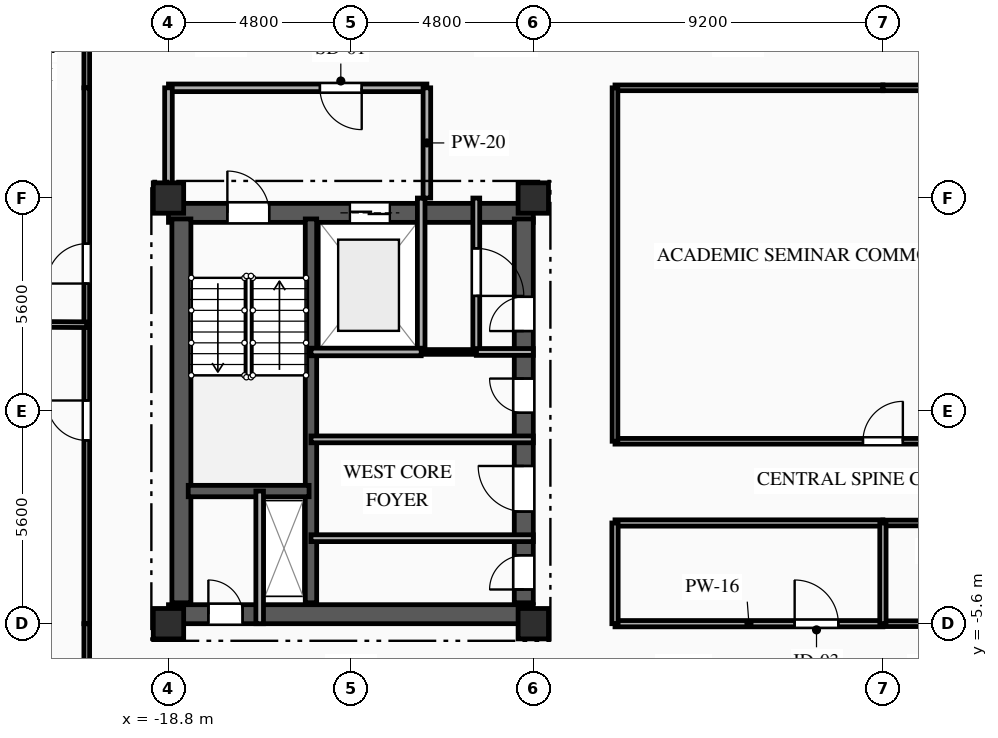
"""IFC4 building model, lengths in metres.
Left out: names, types, materials, properties, quantities, classifications, styles, units other than length and angle.
Written with IfcOpenShell. Run it as: python <this file> out.ifc"""

import sys

from ifc_helpers import new_model, si_unit, direction, frame, frame_2d, origin, origin_2d, place, context, subcontext, project, spatial, rectangle, extrude, element, fill, save


model = new_model("IFC4")
c1 = context("Model", 3, precision=1e-05, world=origin(), true_north=direction((0.0, 1.0)))
c2 = subcontext(c1, "Body", "Model", "MODEL_VIEW")
j1 = project(units=[si_unit("LENGTHUNIT", "METRE"), si_unit("PLANEANGLEUNIT", "RADIAN")], contexts=[c1])
p1 = place(None, origin())
s1 = spatial("IfcSite", under=j1, at=p1, CompositionType="ELEMENT")
p2 = place(p1, origin())
s2 = spatial("IfcBuilding", under=s1, at=p2, CompositionType="ELEMENT")
p3 = place(p2, frame((0.0, 0.0, 193.05)))
s3 = spatial("IfcBuildingStorey", under=s2, at=p3, CompositionType="ELEMENT", Elevation=193.05)
for number, where, z_axis, x_axis in (
    (1, (-18.8, -5.6, 0.0), (0.0, 0.0, 1.0), (1.0, 0.0, 0.0)),
    (2, (-18.8, 5.6, 0.0), (0.0, 0.0, 1.0), (1.0, 0.0, 0.0)),
    (3, (-9.2, -5.6, 0.0), (0.0, 0.0, 1.0), (1.0, 0.0, 0.0)),
    (4, (-9.2, 5.6, 0.0), (0.0, 0.0, 1.0), (1.0, 0.0, 0.0)),
):
    element("IfcColumn", number, at=place(p3, frame(where, z_axis=z_axis, x_axis=x_axis)), inside=s3, PredefinedType="COLUMN", context=c2, shape_type="SweptSolid", body=[
        extrude(rectangle(XDim=0.8, YDim=0.8, at=origin_2d()), origin(), (0.0, 0.0, 1.0), 3.35),
    ])
p4 = place(p3, frame((-18.8, 5.21, 0.0), z_axis=(0.0, 0.0, 1.0), x_axis=(1.0, 0.0, 0.0)))
e5 = element("IfcWall", 5, at=p4, inside=s3, PredefinedType="SHEAR", context=c2, shape_type="SweptSolid", body=[
    extrude(rectangle(XDim=9.6, YDim=0.5, at=frame_2d((4.8, 0.0))), origin(), (0.0, 0.0, 1.0), 3.04),
])
p5 = place(p4, frame((1.55, 0.0, 0.0)))
e6 = element("IfcOpeningElement", 6, at=p5, cuts=e5, PredefinedType="OPENING", context=c2, shape_type="SweptSolid", body=[
    extrude(rectangle(XDim=1.1, YDim=2.15, at=frame_2d((0.55, 1.075))), frame((0.0, 0.26, 0.0), z_axis=(0.0, -1.0, 0.0), x_axis=(1.0, 0.0, 0.0)), (0.0, 0.0, 1.0), 0.52),
])
p6 = place(p4, frame((4.775, 0.0, 0.0)))
e7 = element("IfcOpeningElement", 7, at=p6, cuts=e5, PredefinedType="OPENING", context=c2, shape_type="SweptSolid", body=[
    extrude(rectangle(XDim=1.05, YDim=2.1, at=frame_2d((0.525, 1.05))), frame((0.0, 0.26, 0.0), z_axis=(0.0, -1.0, 0.0), x_axis=(1.0, 0.0, 0.0)), (0.0, 0.0, 1.0), 0.52),
])
p7 = place(p3, frame((-18.8, -5.35, 0.0), z_axis=(0.0, 0.0, 1.0), x_axis=(1.0, 0.0, 0.0)))
e8 = element("IfcWall", 8, at=p7, inside=s3, PredefinedType="SHEAR", context=c2, shape_type="SweptSolid", body=[
    extrude(rectangle(XDim=9.6, YDim=0.5, at=frame_2d((4.8, 0.0))), origin(), (0.0, 0.0, 1.0), 3.04),
])
p8 = place(p7, frame((1.05, 0.0, 0.0)))
e9 = element("IfcOpeningElement", 9, at=p8, cuts=e8, PredefinedType="OPENING", context=c2, shape_type="SweptSolid", body=[
    extrude(rectangle(XDim=0.9, YDim=2.1, at=frame_2d((0.45, 1.05))), frame((0.0, 0.26, 0.0), z_axis=(0.0, -1.0, 0.0), x_axis=(1.0, 0.0, 0.0)), (0.0, 0.0, 1.0), 0.52),
])
p9 = place(p3, frame((-18.46, -5.05, 0.0), z_axis=(0.0, 0.0, 1.0), x_axis=(0.0, 1.0, 0.0)))
e10 = element("IfcWall", 10, at=p9, inside=s3, PredefinedType="SHEAR", context=c2, shape_type="SweptSolid", body=[
    extrude(rectangle(XDim=10.1, YDim=0.5, at=frame_2d((5.05, 0.0))), origin(), (0.0, 0.0, 1.0), 3.04),
])
p10 = place(p3, frame((-9.45, -5.05, 0.0), z_axis=(0.0, 0.0, 1.0), x_axis=(0.0, 1.0, 0.0)))
e11 = element("IfcWall", 11, at=p10, inside=s3, PredefinedType="SHEAR", context=c2, shape_type="SweptSolid", body=[
    extrude(rectangle(XDim=10.1, YDim=0.5, at=frame_2d((5.05, 0.0))), origin(), (0.0, 0.0, 1.0), 3.04),
])
p11 = place(p10, frame((7.15, 0.0, 0.0)))
e12 = element("IfcOpeningElement", 12, at=p11, cuts=e11, PredefinedType="OPENING", context=c2, shape_type="SweptSolid", body=[
    extrude(rectangle(XDim=0.9, YDim=2.1, at=frame_2d((0.45, 1.05))), frame((0.0, 0.26, 0.0), z_axis=(0.0, -1.0, 0.0), x_axis=(1.0, 0.0, 0.0)), (0.0, 0.0, 1.0), 0.52),
])
p12 = place(p10, frame((2.4, 0.0, 0.0)))
e13 = element("IfcOpeningElement", 13, at=p12, cuts=e11, PredefinedType="OPENING", context=c2, shape_type="SweptSolid", body=[
    extrude(rectangle(XDim=1.2, YDim=2.15, at=frame_2d((0.6, 1.075))), frame((0.0, 0.26, 0.0), z_axis=(0.0, -1.0, 0.0), x_axis=(1.0, 0.0, 0.0)), (0.0, 0.0, 1.0), 0.52),
])
p13 = place(p10, frame((0.35, 0.0, 0.0)))
e14 = element("IfcOpeningElement", 14, at=p13, cuts=e11, PredefinedType="OPENING", context=c2, shape_type="SweptSolid", body=[
    extrude(rectangle(XDim=0.9, YDim=2.1, at=frame_2d((0.45, 1.05))), frame((0.0, 0.26, 0.0), z_axis=(0.0, -1.0, 0.0), x_axis=(1.0, 0.0, 0.0)), (0.0, 0.0, 1.0), 0.52),
])
p14 = place(p10, frame((5.0, 0.0, 0.0)))
e15 = element("IfcOpeningElement", 15, at=p14, cuts=e11, PredefinedType="OPENING", context=c2, shape_type="SweptSolid", body=[
    extrude(rectangle(XDim=0.9, YDim=2.1, at=frame_2d((0.45, 1.05))), frame((0.0, 0.26, 0.0), z_axis=(0.0, -1.0, 0.0), x_axis=(1.0, 0.0, 0.0)), (0.0, 0.0, 1.0), 0.52),
])
p15 = place(p3, frame((-15.05, -5.05, 0.0), z_axis=(0.0, 0.0, 1.0), x_axis=(0.0, 1.0, 0.0)))
e16 = element("IfcWall", 16, at=p15, inside=s3, PredefinedType="SHEAR", context=c2, shape_type="SweptSolid", body=[
    extrude(rectangle(XDim=10.1, YDim=0.3, at=frame_2d((5.05, 0.0))), origin(), (0.0, 0.0, 1.0), 3.04),
])
p16 = place(p3, frame((-18.28, -2.11, 0.0), z_axis=(0.0, 0.0, 1.0), x_axis=(1.0, 0.0, 0.0)))
e17 = element("IfcWall", 17, at=p16, inside=s3, PredefinedType="SHEAR", context=c2, shape_type="SweptSolid", body=[
    extrude(rectangle(XDim=3.18, YDim=0.3, at=frame_2d((1.59, 0.0))), origin(), (0.0, 0.0, 1.0), 3.04),
])
p17 = place(p3, frame((-16.4, -5.6, 0.0), z_axis=(0.0, 0.0, 1.0), x_axis=(0.0, 1.0, 0.0)))
e18 = element("IfcWall", 18, at=p17, inside=s3, PredefinedType="PARTITIONING", context=c2, shape_type="SweptSolid", body=[
    extrude(rectangle(XDim=3.49, YDim=0.2, at=frame_2d((1.745, 0.0))), origin(), (0.0, 0.0, 1.0), 3.04),
])
p18 = place(p3, frame((-12.15, 1.55, 0.0), z_axis=(0.0, 0.0, 1.0), x_axis=(0.0, 1.0, 0.0)))
e19 = element("IfcWall", 19, at=p18, inside=s3, PredefinedType="PARTITIONING", context=c2, shape_type="SweptSolid", body=[
    extrude(rectangle(XDim=4.05, YDim=0.2, at=frame_2d((2.025, 0.0))), origin(), (0.0, 0.0, 1.0), 3.04),
])
p19 = place(p3, frame((-12.0, 8.5, 0.0), z_axis=(0.0, 0.0, 1.0), x_axis=(-1.0, 0.0, 0.0)))
e20 = element("IfcWall", 20, at=p19, inside=s3, PredefinedType="PARTITIONING", context=c2, shape_type="SweptSolid", body=[
    extrude(rectangle(XDim=6.8, YDim=0.2, at=frame_2d((3.4, 0.0))), origin(), (0.0, 0.0, 1.0), 3.04),
])
p20 = place(p19, frame((1.715, 0.0, 0.0)))
e21 = element("IfcOpeningElement", 21, at=p20, cuts=e20, PredefinedType="OPENING", context=c2, shape_type="SweptSolid", body=[
    extrude(rectangle(XDim=1.1, YDim=2.15, at=frame_2d((0.55, 1.075))), frame((0.0, 0.11, 0.0), z_axis=(0.0, -1.0, 0.0), x_axis=(1.0, 0.0, 0.0)), (0.0, 0.0, 1.0), 0.22),
])
p21 = place(p3, frame((-18.8, 8.5, 0.0), z_axis=(0.0, 0.0, 1.0), x_axis=(0.0, -1.0, 0.0)))
e22 = element("IfcWall", 22, at=p21, inside=s3, PredefinedType="PARTITIONING", context=c2, shape_type="SweptSolid", body=[
    extrude(rectangle(XDim=2.9, YDim=0.2, at=frame_2d((1.45, 0.0))), origin(), (0.0, 0.0, 1.0), 2.665),
])
p22 = place(p3, frame((-12.0, 5.6, 0.0), z_axis=(0.0, 0.0, 1.0), x_axis=(0.0, 1.0, 0.0)))
e23 = element("IfcWall", 23, at=p22, inside=s3, PredefinedType="PARTITIONING", context=c2, shape_type="SweptSolid", body=[
    extrude(rectangle(XDim=2.9, YDim=0.2, at=frame_2d((1.45, 0.0))), origin(), (0.0, 0.0, 1.0), 3.04),
])
p23 = place(p3, frame((-10.7, 5.6, 0.0), z_axis=(0.0, 0.0, 1.0), x_axis=(0.0, -1.0, 0.0)))
e24 = element("IfcWall", 24, at=p23, inside=s3, PredefinedType="PARTITIONING", context=c2, shape_type="SweptSolid", body=[
    extrude(rectangle(XDim=4.05, YDim=0.18, at=frame_2d((2.025, 0.0))), origin(), (0.0, 0.0, 1.0), 3.04),
])
p24 = place(p23, frame((1.325, 0.0, 0.0)))
e25 = element("IfcOpeningElement", 25, at=p24, cuts=e24, PredefinedType="OPENING", context=c2, shape_type="SweptSolid", body=[
    extrude(rectangle(XDim=1.25, YDim=2.2, at=frame_2d((0.625, 1.1))), frame((0.0, 0.1, 0.0), z_axis=(0.0, -1.0, 0.0), x_axis=(1.0, 0.0, 0.0)), (0.0, 0.0, 1.0), 0.2),
])
p25 = place(p3, frame((-10.7, 1.55, 0.0), z_axis=(0.0, 0.0, 1.0), x_axis=(1.0, 0.0, 0.0)))
e26 = element("IfcWall", 26, at=p25, inside=s3, PredefinedType="PARTITIONING", context=c2, shape_type="SweptSolid", body=[
    extrude(rectangle(XDim=1.5, YDim=0.18, at=frame_2d((0.75, 0.0))), origin(), (0.0, 0.0, 1.0), 3.04),
])
p26 = place(p3, frame((-12.15, 1.55, 0.0), z_axis=(0.0, 0.0, 1.0), x_axis=(1.0, 0.0, 0.0)))
e27 = element("IfcWall", 27, at=p26, inside=s3, PredefinedType="PARTITIONING", context=c2, shape_type="SweptSolid", body=[
    extrude(rectangle(XDim=1.45, YDim=0.125, at=frame_2d((0.725, 0.0))), origin(), (0.0, 0.0, 1.0), 3.04),
])
p27 = place(p3, frame((-15.05, -3.35, 0.0), z_axis=(0.0, 0.0, 1.0), x_axis=(1.0, 0.0, 0.0)))
e28 = element("IfcWall", 28, at=p27, inside=s3, PredefinedType="PARTITIONING", context=c2, shape_type="SweptSolid", body=[
    extrude(rectangle(XDim=5.85, YDim=0.18, at=frame_2d((2.925, 0.0))), origin(), (0.0, 0.0, 1.0), 2.755),
])
p28 = place(p3, frame((-9.2, -0.75, 0.0), z_axis=(0.0, 0.0, 1.0), x_axis=(-1.0, 0.0, 0.0)))
e29 = element("IfcWall", 29, at=p28, inside=s3, PredefinedType="PARTITIONING", context=c2, shape_type="SweptSolid", body=[
    extrude(rectangle(XDim=5.85, YDim=0.18, at=frame_2d((2.925, 0.0))), origin(), (0.0, 0.0, 1.0), 3.04),
])
p29 = place(p3, frame((-20.95, 8.5, 0.0), z_axis=(0.0, 0.0, 1.0), x_axis=(0.0, 1.0, 0.0)))
e30 = element("IfcWall", 30, at=p29, inside=s3, PredefinedType="PARTITIONING", context=c2, shape_type="SweptSolid", body=[
    extrude(rectangle(XDim=2.15, YDim=0.15, at=frame_2d((1.075, 0.0))), origin(), (0.0, 0.0, 1.0), 3.04),
])
for number, where, z_axis, x_axis in (
    (31, (0.0, 8.5, 0.0), (0.0, 0.0, 1.0), (-1.0, 0.0, 0.0)),
    (32, (7.05, 8.5, 0.0), (0.0, 0.0, 1.0), (-1.0, 0.0, 0.0)),
):
    element("IfcWall", number, at=place(p3, frame(where, z_axis=z_axis, x_axis=x_axis)), inside=s3, PredefinedType="PARTITIONING", context=c2, shape_type="SweptSolid", body=[
        extrude(rectangle(XDim=7.05, YDim=0.15, at=frame_2d((3.525, 0.0))), origin(), (0.0, 0.0, 1.0), 3.04),
    ])
p30 = place(p3, frame((-20.95, -7.75, 0.0), z_axis=(0.0, 0.0, 1.0), x_axis=(0.0, 1.0, 0.0)))
e33 = element("IfcWall", 33, at=p30, inside=s3, PredefinedType="PARTITIONING", context=c2, shape_type="SweptSolid", body=[
    extrude(rectangle(XDim=2.15, YDim=0.15, at=frame_2d((1.075, 0.0))), origin(), (0.0, 0.0, 1.0), 3.04),
])
p31 = place(p3, frame((-7.05, -5.6, 0.0), z_axis=(0.0, 0.0, 1.0), x_axis=(1.0, 0.0, 0.0)))
e34 = element("IfcWall", 34, at=p31, inside=s3, PredefinedType="PARTITIONING", context=c2, shape_type="SweptSolid", body=[
    extrude(rectangle(XDim=7.05, YDim=0.165, at=frame_2d((3.525, 0.0))), origin(), (0.0, 0.0, 1.0), 2.525),
])
p32 = place(p31, frame((4.728, 0.0, 0.0)))
e35 = element("IfcOpeningElement", 35, at=p32, cuts=e34, PredefinedType="OPENING", context=c2, shape_type="SweptSolid", body=[
    extrude(rectangle(XDim=1.15, YDim=2.15, at=frame_2d((0.575, 1.075))), frame((0.0, 0.093, 0.0), z_axis=(0.0, -1.0, 0.0), x_axis=(1.0, 0.0, 0.0)), (0.0, 0.0, 1.0), 0.185),
])
p33 = place(p3, frame((0.0, -5.6, 0.0), z_axis=(0.0, 0.0, 1.0), x_axis=(1.0, 0.0, 0.0)))
e36 = element("IfcWall", 36, at=p33, inside=s3, PredefinedType="PARTITIONING", context=c2, shape_type="SweptSolid", body=[
    extrude(rectangle(XDim=7.05, YDim=0.15, at=frame_2d((3.525, 0.0))), origin(), (0.0, 0.0, 1.0), 2.525),
])
p34 = place(p33, frame((1.185, 0.0, 0.0)))
e37 = element("IfcOpeningElement", 37, at=p34, cuts=e36, PredefinedType="OPENING", context=c2, shape_type="SweptSolid", body=[
    extrude(rectangle(XDim=1.05, YDim=2.15, at=frame_2d((0.525, 1.075))), frame((0.0, 0.085, 0.0), z_axis=(0.0, -1.0, 0.0), x_axis=(1.0, 0.0, 0.0)), (0.0, 0.0, 1.0), 0.17),
])
p35 = place(p3, frame((-20.95, -5.6, 0.0), z_axis=(0.0, 0.0, 1.0), x_axis=(0.0, 1.0, 0.0)))
e38 = element("IfcWall", 38, at=p35, inside=s3, PredefinedType="PARTITIONING", context=c2, shape_type="SweptSolid", body=[
    extrude(rectangle(XDim=7.867, YDim=0.15, at=frame_2d((3.934, 0.0))), origin(), (0.0, 0.0, 1.0), 3.04),
])
p36 = place(p35, frame((4.823, 0.0, 0.0)))
e39 = element("IfcOpeningElement", 39, at=p36, cuts=e38, PredefinedType="OPENING", context=c2, shape_type="SweptSolid", body=[
    extrude(rectangle(XDim=1.05, YDim=2.15, at=frame_2d((0.525, 1.075))), frame((0.0, 0.085, 0.0), z_axis=(0.0, -1.0, 0.0), x_axis=(1.0, 0.0, 0.0)), (0.0, 0.0, 1.0), 0.17),
])
p37 = place(p3, frame((-20.95, 2.267, 0.0), z_axis=(0.0, 0.0, 1.0), x_axis=(0.0, 1.0, 0.0)))
e40 = element("IfcWall", 40, at=p37, inside=s3, PredefinedType="PARTITIONING", context=c2, shape_type="SweptSolid", body=[
    extrude(rectangle(XDim=6.233, YDim=0.15, at=frame_2d((3.116, 0.0))), origin(), (0.0, 0.0, 1.0), 3.04),
])
p38 = place(p37, frame((1.083, 0.0, 0.0)))
e41 = element("IfcOpeningElement", 41, at=p38, cuts=e40, PredefinedType="OPENING", context=c2, shape_type="SweptSolid", body=[
    extrude(rectangle(XDim=1.05, YDim=2.15, at=frame_2d((0.525, 1.075))), frame((0.0, 0.085, 0.0), z_axis=(0.0, -1.0, 0.0), x_axis=(1.0, 0.0, 0.0)), (0.0, 0.0, 1.0), 0.17),
])
p39 = place(p3, frame((-7.05, -0.8, 0.0), z_axis=(0.0, 0.0, 1.0), x_axis=(1.0, 0.0, 0.0)))
e42 = element("IfcWall", 42, at=p39, inside=s3, PredefinedType="PARTITIONING", context=c2, shape_type="SweptSolid", body=[
    extrude(rectangle(XDim=14.1, YDim=0.15, at=frame_2d((7.05, 0.0))), origin(), (0.0, 0.0, 1.0), 3.04),
])
p40 = place(p39, frame((6.525, 0.0, 0.0)))
e43 = element("IfcOpeningElement", 43, at=p40, cuts=e42, PredefinedType="OPENING", context=c2, shape_type="SweptSolid", body=[
    extrude(rectangle(XDim=1.05, YDim=2.15, at=frame_2d((0.525, 1.075))), frame((0.0, 0.085, 0.0), z_axis=(0.0, -1.0, 0.0), x_axis=(1.0, 0.0, 0.0)), (0.0, 0.0, 1.0), 0.17),
])
p41 = place(p3, frame((0.0, -2.95, 0.0), z_axis=(0.0, 0.0, 1.0), x_axis=(-1.0, 0.0, 0.0)))
e44 = element("IfcWall", 44, at=p41, inside=s3, PredefinedType="PARTITIONING", context=c2, shape_type="SweptSolid", body=[
    extrude(rectangle(XDim=7.05, YDim=0.165, at=frame_2d((3.525, 0.0))), origin(), (0.0, 0.0, 1.0), 3.04),
])
p42 = place(p3, frame((7.05, -2.95, 0.0), z_axis=(0.0, 0.0, 1.0), x_axis=(-1.0, 0.0, 0.0)))
e45 = element("IfcWall", 45, at=p42, inside=s3, PredefinedType="PARTITIONING", context=c2, shape_type="SweptSolid", body=[
    extrude(rectangle(XDim=7.05, YDim=0.15, at=frame_2d((3.525, 0.0))), origin(), (0.0, 0.0, 1.0), 3.04),
])
p43 = place(p3, frame((-7.05, 8.5, 0.0), z_axis=(0.0, 0.0, 1.0), x_axis=(0.0, -1.0, 0.0)))
e46 = element("IfcWall", 46, at=p43, inside=s3, PredefinedType="PARTITIONING", context=c2, shape_type="SweptSolid", body=[
    extrude(rectangle(XDim=9.3, YDim=0.15, at=frame_2d((4.65, 0.0))), origin(), (0.0, 0.0, 1.0), 3.04),
])
p44 = place(p3, frame((-7.05, -2.95, 0.0), z_axis=(0.0, 0.0, 1.0), x_axis=(0.0, -1.0, 0.0)))
e47 = element("IfcWall", 47, at=p44, inside=s3, PredefinedType="PARTITIONING", context=c2, shape_type="SweptSolid", body=[
    extrude(rectangle(XDim=2.65, YDim=0.165, at=frame_2d((1.325, 0.0))), origin(), (0.0, 0.0, 1.0), 3.04),
])
p45 = place(p3, frame((-28.021, 2.311, 0.0), z_axis=(0.0, 0.0, 1.0), x_axis=(0.99998090118, -0.006180394355, 0.0)))
e48 = element("IfcWall", 48, at=p45, inside=s3, PredefinedType="PARTITIONING", context=c2, shape_type="SweptSolid", body=[
    extrude(rectangle(XDim=7.071, YDim=0.15, at=frame_2d((3.536, 0.0))), origin(), (0.0, 0.0, 1.0), 3.04),
])
p46 = place(p3, frame((0.0, -2.95, 0.0), z_axis=(0.0, 0.0, 1.0), x_axis=(0.0, -1.0, 0.0)))
e49 = element("IfcWall", 49, at=p46, inside=s3, PredefinedType="PARTITIONING", context=c2, shape_type="SweptSolid", body=[
    extrude(rectangle(XDim=2.65, YDim=0.165, at=frame_2d((1.325, 0.0))), origin(), (0.0, 0.0, 1.0), 3.04),
])
p47 = place(p3, frame((-15.05, 1.55, 0.0), z_axis=(0.0, 0.0, 1.0), x_axis=(1.0, 0.0, 0.0)))
e50 = element("IfcWall", 50, at=p47, inside=s3, PredefinedType="PARTITIONING", context=c2, shape_type="SweptSolid", body=[
    extrude(rectangle(XDim=2.9, YDim=0.2, at=frame_2d((1.45, 0.0))), origin(), (0.0, 0.0, 1.0), 3.04),
])
p48 = place(p5, origin())
e51 = element("IfcDoor", 51, at=p48, inside=s3, OperationType="SINGLE_SWING_LEFT", PredefinedType="DOOR", context=c2, shape_type="SweptSolid", body=[
    extrude(rectangle(XDim=1.1, YDim=2.15, at=frame_2d((0.55, 1.075))), frame((0.0, 0.025, 0.0), z_axis=(0.0, -1.0, 0.0), x_axis=(1.0, 0.0, 0.0)), (0.0, 0.0, 1.0), 0.05),
])
fill(e6, e51)
p49 = place(p6, origin())
e52 = element("IfcDoor", 52, at=p49, inside=s3, OperationType="DOUBLE_DOOR_SLIDING", PredefinedType="DOOR", context=c2, shape_type="SweptSolid", body=[
    extrude(rectangle(XDim=1.05, YDim=2.1, at=frame_2d((0.525, 1.05))), frame((0.0, 0.025, 0.0), z_axis=(0.0, -1.0, 0.0), x_axis=(1.0, 0.0, 0.0)), (0.0, 0.0, 1.0), 0.05),
])
fill(e7, e52)
p50 = place(p8, origin())
e53 = element("IfcDoor", 53, at=p50, inside=s3, OperationType="SINGLE_SWING_LEFT", PredefinedType="DOOR", context=c2, shape_type="SweptSolid", body=[
    extrude(rectangle(XDim=0.9, YDim=2.1, at=frame_2d((0.45, 1.05))), frame((0.0, 0.025, 0.0), z_axis=(0.0, -1.0, 0.0), x_axis=(1.0, 0.0, 0.0)), (0.0, 0.0, 1.0), 0.05),
])
fill(e9, e53)
p51 = place(p20, origin())
e54 = element("IfcDoor", 54, at=p51, inside=s3, OperationType="SINGLE_SWING_LEFT", PredefinedType="DOOR", context=c2, shape_type="SweptSolid", body=[
    extrude(rectangle(XDim=1.1, YDim=2.15, at=frame_2d((0.55, 1.075))), frame((0.0, 0.025, 0.0), z_axis=(0.0, -1.0, 0.0), x_axis=(1.0, 0.0, 0.0)), (0.0, 0.0, 1.0), 0.05),
])
fill(e21, e54)
p52 = place(p24, origin())
e55 = element("IfcDoor", 55, at=p52, inside=s3, OperationType="SINGLE_SWING_RIGHT", PredefinedType="DOOR", context=c2, shape_type="SweptSolid", body=[
    extrude(rectangle(XDim=1.25, YDim=2.2, at=frame_2d((0.625, 1.1))), frame((0.0, 0.025, 0.0), z_axis=(0.0, -1.0, 0.0), x_axis=(1.0, 0.0, 0.0)), (0.0, 0.0, 1.0), 0.05),
])
fill(e25, e55)
p53 = place(p11, origin())
e56 = element("IfcDoor", 56, at=p53, inside=s3, OperationType="SINGLE_SWING_LEFT", PredefinedType="DOOR", context=c2, shape_type="SweptSolid", body=[
    extrude(rectangle(XDim=0.9, YDim=2.1, at=frame_2d((0.45, 1.05))), frame((0.0, 0.025, 0.0), z_axis=(0.0, -1.0, 0.0), x_axis=(1.0, 0.0, 0.0)), (0.0, 0.0, 1.0), 0.05),
])
fill(e12, e56)
p54 = place(p12, origin())
e57 = element("IfcDoor", 57, at=p54, inside=s3, OperationType="SINGLE_SWING_RIGHT", PredefinedType="DOOR", context=c2, shape_type="SweptSolid", body=[
    extrude(rectangle(XDim=1.2, YDim=2.15, at=frame_2d((0.6, 1.075))), frame((0.0, 0.025, 0.0), z_axis=(0.0, -1.0, 0.0), x_axis=(1.0, 0.0, 0.0)), (0.0, 0.0, 1.0), 0.05),
])
fill(e13, e57)
p55 = place(p13, origin())
e58 = element("IfcDoor", 58, at=p55, inside=s3, OperationType="SINGLE_SWING_LEFT", PredefinedType="DOOR", context=c2, shape_type="SweptSolid", body=[
    extrude(rectangle(XDim=0.9, YDim=2.1, at=frame_2d((0.45, 1.05))), frame((0.0, 0.025, 0.0), z_axis=(0.0, -1.0, 0.0), x_axis=(1.0, 0.0, 0.0)), (0.0, 0.0, 1.0), 0.05),
])
fill(e14, e58)
p56 = place(p14, origin())
e59 = element("IfcDoor", 59, at=p56, inside=s3, OperationType="SINGLE_SWING_RIGHT", PredefinedType="DOOR", context=c2, shape_type="SweptSolid", body=[
    extrude(rectangle(XDim=0.9, YDim=2.1, at=frame_2d((0.45, 1.05))), frame((0.0, 0.025, 0.0), z_axis=(0.0, -1.0, 0.0), x_axis=(1.0, 0.0, 0.0)), (0.0, 0.0, 1.0), 0.05),
])
fill(e15, e59)
p57 = place(p32, origin())
e60 = element("IfcDoor", 60, at=p57, inside=s3, OperationType="SINGLE_SWING_LEFT", PredefinedType="DOOR", context=c2, shape_type="SweptSolid", body=[
    extrude(rectangle(XDim=1.15, YDim=2.15, at=frame_2d((0.575, 1.075))), frame((0.0, 0.025, 0.0), z_axis=(0.0, -1.0, 0.0), x_axis=(1.0, 0.0, 0.0)), (0.0, 0.0, 1.0), 0.05),
])
fill(e35, e60)
p58 = place(p36, origin())
e61 = element("IfcDoor", 61, at=p58, inside=s3, OperationType="SINGLE_SWING_RIGHT", PredefinedType="DOOR", context=c2, shape_type="SweptSolid", body=[
    extrude(rectangle(XDim=1.05, YDim=2.15, at=frame_2d((0.525, 1.075))), frame((0.0, 0.025, 0.0), z_axis=(0.0, -1.0, 0.0), x_axis=(1.0, 0.0, 0.0)), (0.0, 0.0, 1.0), 0.05),
])
fill(e39, e61)
p59 = place(p38, origin())
e62 = element("IfcDoor", 62, at=p59, inside=s3, OperationType="SINGLE_SWING_LEFT", PredefinedType="DOOR", context=c2, shape_type="SweptSolid", body=[
    extrude(rectangle(XDim=1.05, YDim=2.15, at=frame_2d((0.525, 1.075))), frame((0.0, 0.025, 0.0), z_axis=(0.0, -1.0, 0.0), x_axis=(1.0, 0.0, 0.0)), (0.0, 0.0, 1.0), 0.05),
])
fill(e41, e62)
p60 = place(p40, origin())
e63 = element("IfcDoor", 63, at=p60, inside=s3, OperationType="SINGLE_SWING_RIGHT", PredefinedType="DOOR", context=c2, shape_type="SweptSolid", body=[
    extrude(rectangle(XDim=1.05, YDim=2.15, at=frame_2d((0.525, 1.075))), frame((0.0, 0.025, 0.0), z_axis=(0.0, -1.0, 0.0), x_axis=(1.0, 0.0, 0.0)), (0.0, 0.0, 1.0), 0.05),
])
fill(e43, e63)
save(model, sys.argv[1])
